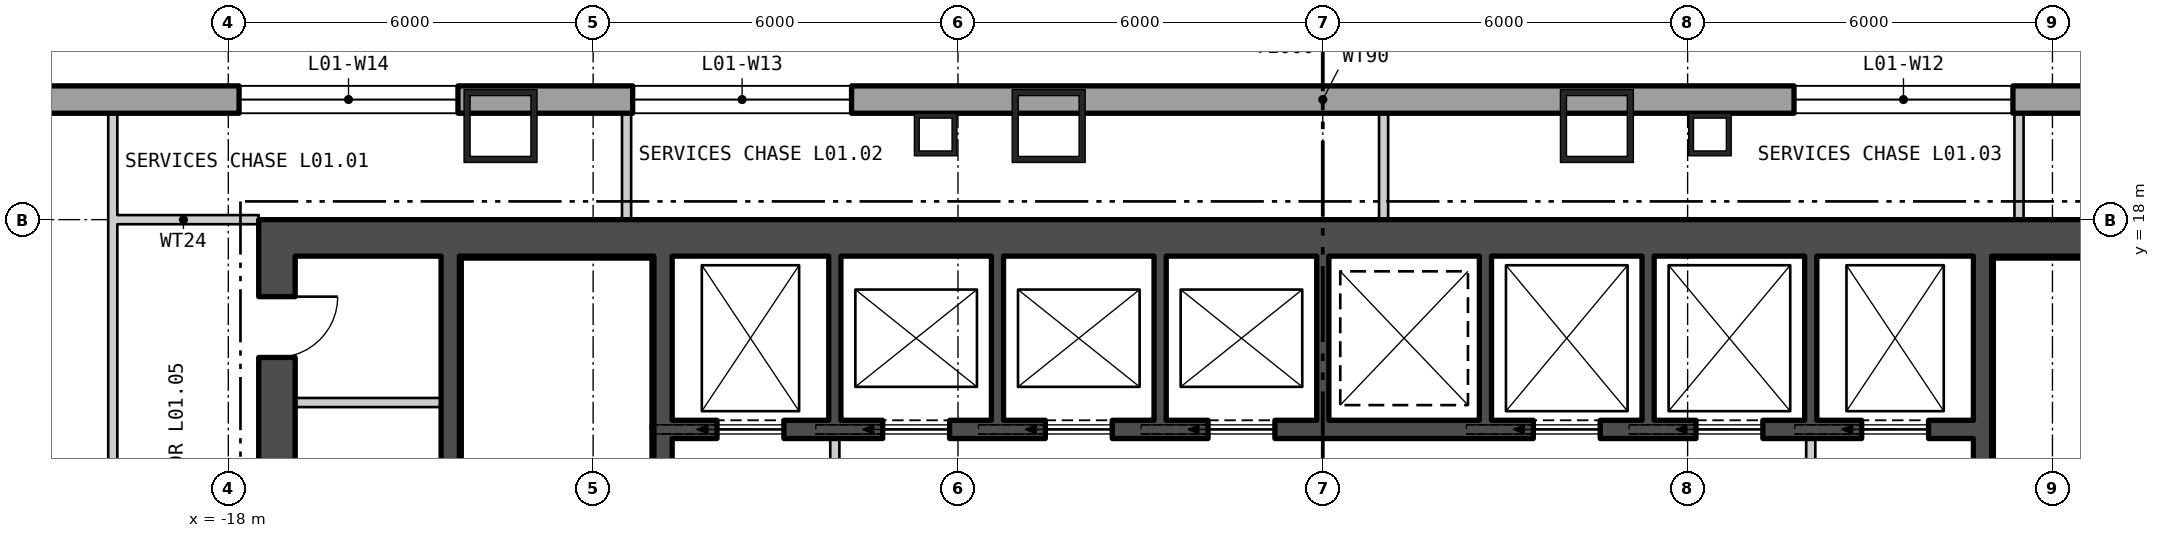
"""IFC4 building model, lengths in metres.
Left out: names, types, materials, properties, quantities, classifications, styles, units other than length and angle.
Written with IfcOpenShell. Run it as: python <this file> out.ifc"""

import sys

from ifc_helpers import new_model, si_unit, direction, frame, frame_2d, origin, origin_2d, place, context, subcontext, project, spatial, polyline, rectangle, hollow_rectangle, outline, extrude, element, fill, save


model = new_model("IFC4")
c1 = context("Model", 3, precision=1e-05, world=origin(), true_north=direction((0.0, 1.0)))
c2 = subcontext(c1, "Body", "Model", "MODEL_VIEW")
j1 = project(units=[si_unit("LENGTHUNIT", "METRE"), si_unit("PLANEANGLEUNIT", "RADIAN")], contexts=[c1])
p1 = place(None, origin())
s1 = spatial("IfcSite", under=j1, at=p1, CompositionType="ELEMENT")
p2 = place(p1, origin())
s2 = spatial("IfcBuilding", under=s1, at=p2, CompositionType="ELEMENT")
p3 = place(p2, frame((0.0, 0.0, 8.4)))
s3 = spatial("IfcBuildingStorey", under=s2, at=p3, CompositionType="ELEMENT", Elevation=8.4)
for number, where, z_axis, x_axis in (
    (1, (4.508, 19.54, 0.0), (0.0, 0.0, 1.0), (-1.0, 0.0, 0.0)),
    (2, (-4.508, 19.54, 0.0), (0.0, 0.0, 1.0), (-1.0, 0.0, 0.0)),
    (3, (-13.523, 19.54, 0.0), (0.0, 0.0, 1.0), (-1.0, 0.0, 0.0)),
):
    element("IfcColumn", number, at=place(p3, frame(where, z_axis=z_axis, x_axis=x_axis)), inside=s3, PredefinedType="COLUMN", context=c2, shape_type="SweptSolid", body=[
        extrude(hollow_rectangle(XDim=1.2, YDim=1.2, WallThickness=0.1, at=origin_2d()), origin(), (0.0, 0.0, 1.0), 5.1),
    ])
for number, where, z_axis, x_axis in (
    (4, (6.367, 19.4, 0.0), (0.0, 0.0, 1.0), (-1.0, 0.0, 0.0)),
    (5, (-6.367, 19.4, 0.0), (0.0, 0.0, 1.0), (-1.0, 0.0, 0.0)),
):
    element("IfcColumn", number, at=place(p3, frame(where, z_axis=z_axis, x_axis=x_axis)), inside=s3, PredefinedType="COLUMN", context=c2, shape_type="SweptSolid", body=[
        extrude(hollow_rectangle(XDim=0.7, YDim=0.7, WallThickness=0.08, at=origin_2d()), origin(), (0.0, 0.0, 1.0), 5.1),
    ])
p4 = place(p3, frame((38.775, 19.975, -0.4), z_axis=(0.0, 0.0, 1.0), x_axis=(-1.0, 0.0, 0.0)))
e6 = element("IfcWall", 6, at=p4, inside=s3, PredefinedType="SOLIDWALL", context=c2, shape_type="SweptSolid", body=[
    extrude(outline(polyline([(-0.225, -0.225), (77.775, -0.225), (77.325, 0.225), (0.225, 0.225), (-0.225, -0.225)])), origin(), (0.0, 0.0, 1.0), 5.1),
])
p5 = place(p4, frame((1.958, 0.0, 1.3)))
e7 = element("IfcOpeningElement", 7, at=p5, cuts=e6, PredefinedType="OPENING", context=c2, shape_type="SweptSolid", body=[
    extrude(rectangle(XDim=3.6, YDim=3.2, at=frame_2d((1.8, 1.6))), frame((0.0, 0.235, 0.0), z_axis=(0.0, -1.0, 0.0), x_axis=(1.0, 0.0, 0.0)), (0.0, 0.0, 1.0), 0.47),
])
p6 = place(p4, frame((8.325, 0.0, 1.3)))
e8 = element("IfcOpeningElement", 8, at=p6, cuts=e6, PredefinedType="OPENING", context=c2, shape_type="SweptSolid", body=[
    extrude(rectangle(XDim=3.6, YDim=3.2, at=frame_2d((1.8, 1.6))), frame((0.0, 0.235, 0.0), z_axis=(0.0, -1.0, 0.0), x_axis=(1.0, 0.0, 0.0)), (0.0, 0.0, 1.0), 0.47),
])
p7 = place(p4, frame((20.952, 0.0, 1.3)))
e9 = element("IfcOpeningElement", 9, at=p7, cuts=e6, PredefinedType="OPENING", context=c2, shape_type="SweptSolid", body=[
    extrude(rectangle(XDim=3.6, YDim=3.2, at=frame_2d((1.8, 1.6))), frame((0.0, 0.235, 0.0), z_axis=(0.0, -1.0, 0.0), x_axis=(1.0, 0.0, 0.0)), (0.0, 0.0, 1.0), 0.47),
])
p8 = place(p4, frame((27.425, 0.0, 1.3)))
e10 = element("IfcOpeningElement", 10, at=p8, cuts=e6, PredefinedType="OPENING", context=c2, shape_type="SweptSolid", body=[
    extrude(rectangle(XDim=3.6, YDim=3.2, at=frame_2d((1.8, 1.6))), frame((0.0, 0.235, 0.0), z_axis=(0.0, -1.0, 0.0), x_axis=(1.0, 0.0, 0.0)), (0.0, 0.0, 1.0), 0.47),
])
p9 = place(p4, frame((46.525, 0.0, 1.3)))
e11 = element("IfcOpeningElement", 11, at=p9, cuts=e6, PredefinedType="OPENING", context=c2, shape_type="SweptSolid", body=[
    extrude(rectangle(XDim=3.6, YDim=3.2, at=frame_2d((1.8, 1.6))), frame((0.0, 0.235, 0.0), z_axis=(0.0, -1.0, 0.0), x_axis=(1.0, 0.0, 0.0)), (0.0, 0.0, 1.0), 0.47),
])
p10 = place(p4, frame((52.998, 0.0, 1.3)))
e12 = element("IfcOpeningElement", 12, at=p10, cuts=e6, PredefinedType="OPENING", context=c2, shape_type="SweptSolid", body=[
    extrude(rectangle(XDim=3.6, YDim=3.2, at=frame_2d((1.8, 1.6))), frame((0.0, 0.235, 0.0), z_axis=(0.0, -1.0, 0.0), x_axis=(1.0, 0.0, 0.0)), (0.0, 0.0, 1.0), 0.47),
])
p11 = place(p4, frame((65.625, 0.0, 1.3)))
e13 = element("IfcOpeningElement", 13, at=p11, cuts=e6, PredefinedType="OPENING", context=c2, shape_type="SweptSolid", body=[
    extrude(rectangle(XDim=3.6, YDim=3.2, at=frame_2d((1.8, 1.6))), frame((0.0, 0.235, 0.0), z_axis=(0.0, -1.0, 0.0), x_axis=(1.0, 0.0, 0.0)), (0.0, 0.0, 1.0), 0.47),
])
p12 = place(p4, frame((71.992, 0.0, 1.3)))
e14 = element("IfcOpeningElement", 14, at=p12, cuts=e6, PredefinedType="OPENING", context=c2, shape_type="SweptSolid", body=[
    extrude(rectangle(XDim=3.6, YDim=3.2, at=frame_2d((1.8, 1.6))), frame((0.0, 0.235, 0.0), z_axis=(0.0, -1.0, 0.0), x_axis=(1.0, 0.0, 0.0)), (0.0, 0.0, 1.0), 0.47),
])
p13 = place(p3, frame((-17.5, 17.7, 0.0), z_axis=(0.0, 0.0, 1.0), x_axis=(1.0, 0.0, 0.0)))
e15 = element("IfcWall", 15, at=p13, inside=s3, PredefinedType="SHEAR", context=c2, shape_type="SweptSolid", body=[
    extrude(rectangle(XDim=35.0, YDim=0.6, at=frame_2d((17.5, 0.0))), origin(), (0.0, 0.0, 1.0), 4.88),
])
p14 = place(p3, frame((-17.2, 0.6, 0.0), z_axis=(0.0, 0.0, 1.0), x_axis=(0.0, 1.0, 0.0)))
e16 = element("IfcWall", 16, at=p14, inside=s3, PredefinedType="SHEAR", context=c2, shape_type="SweptSolid", body=[
    extrude(rectangle(XDim=16.8, YDim=0.6, at=frame_2d((8.4, 0.0))), origin(), (0.0, 0.0, 1.0), 4.88),
])
p15 = place(p14, frame((5.7, 0.0, 0.0)))
e17 = element("IfcOpeningElement", 17, at=p15, cuts=e16, PredefinedType="OPENING", context=c2, shape_type="SweptSolid", body=[
    extrude(rectangle(XDim=1.5, YDim=2.1, at=frame_2d((0.75, 1.05))), frame((0.0, 0.31, 0.0), z_axis=(0.0, -1.0, 0.0), x_axis=(1.0, 0.0, 0.0)), (0.0, 0.0, 1.0), 0.62),
])
p16 = place(p14, frame((1.214, 0.0, 0.0)))
e18 = element("IfcOpeningElement", 18, at=p16, cuts=e16, PredefinedType="OPENING", context=c2, shape_type="SweptSolid", body=[
    extrude(rectangle(XDim=0.9, YDim=2.1, at=frame_2d((0.45, 1.05))), frame((0.0, 0.31, 0.0), z_axis=(0.0, -1.0, 0.0), x_axis=(1.0, 0.0, 0.0)), (0.0, 0.0, 1.0), 0.62),
])
p17 = place(p14, frame((4.064, 0.0, 0.0)))
e19 = element("IfcOpeningElement", 19, at=p17, cuts=e16, PredefinedType="OPENING", context=c2, shape_type="SweptSolid", body=[
    extrude(rectangle(XDim=0.9, YDim=2.1, at=frame_2d((0.45, 1.05))), frame((0.0, 0.31, 0.0), z_axis=(0.0, -1.0, 0.0), x_axis=(1.0, 0.0, 0.0)), (0.0, 0.0, 1.0), 0.62),
])
p18 = place(p14, frame((10.383, 0.0, 0.0)))
e20 = element("IfcOpeningElement", 20, at=p18, cuts=e16, PredefinedType="OPENING", context=c2, shape_type="SweptSolid", body=[
    extrude(rectangle(XDim=0.9, YDim=2.1, at=frame_2d((0.45, 1.05))), frame((0.0, 0.31, 0.0), z_axis=(0.0, -1.0, 0.0), x_axis=(1.0, 0.0, 0.0)), (0.0, 0.0, 1.0), 0.62),
])
p19 = place(p14, frame((15.133, 0.0, 0.0)))
e21 = element("IfcOpeningElement", 21, at=p19, cuts=e16, PredefinedType="OPENING", context=c2, shape_type="SweptSolid", body=[
    extrude(rectangle(XDim=1.0, YDim=2.1, at=frame_2d((0.5, 1.05))), frame((0.0, 0.31, 0.0), z_axis=(0.0, -1.0, 0.0), x_axis=(1.0, 0.0, 0.0)), (0.0, 0.0, 1.0), 0.62),
])
p20 = place(p3, frame((-10.85, 0.6, 0.0), z_axis=(0.0, 0.0, 1.0), x_axis=(0.0, 1.0, 0.0)))
e22 = element("IfcWall", 22, at=p20, inside=s3, PredefinedType="SHEAR", context=c2, shape_type="SweptSolid", body=[
    extrude(rectangle(XDim=16.8, YDim=0.3, at=frame_2d((8.4, 0.0))), origin(), (0.0, 0.0, 1.0), 4.88),
])
p21 = place(p20, frame((5.075, 0.0, 0.0)))
e23 = element("IfcOpeningElement", 23, at=p21, cuts=e22, PredefinedType="OPENING", context=c2, shape_type="SweptSolid", body=[
    extrude(rectangle(XDim=1.25, YDim=2.1, at=frame_2d((0.625, 1.05))), frame((0.0, 0.16, 0.0), z_axis=(0.0, -1.0, 0.0), x_axis=(1.0, 0.0, 0.0)), (0.0, 0.0, 1.0), 0.32),
])
p22 = place(p20, frame((1.525, 0.0, 0.0)))
e24 = element("IfcOpeningElement", 24, at=p22, cuts=e22, PredefinedType="OPENING", context=c2, shape_type="SweptSolid", body=[
    extrude(rectangle(XDim=1.0, YDim=2.1, at=frame_2d((0.5, 1.05))), frame((0.0, 0.16, 0.0), z_axis=(0.0, -1.0, 0.0), x_axis=(1.0, 0.0, 0.0)), (0.0, 0.0, 1.0), 0.32),
])
p23 = place(p3, frame((-14.35, 0.6, 0.0), z_axis=(0.0, 0.0, 1.0), x_axis=(0.0, 1.0, 0.0)))
e25 = element("IfcWall", 25, at=p23, inside=s3, PredefinedType="SHEAR", context=c2, shape_type="SweptSolid", body=[
    extrude(rectangle(XDim=16.8, YDim=0.3, at=frame_2d((8.4, 0.0))), origin(), (0.0, 0.0, 1.0), 4.88),
])
p24 = place(p23, frame((5.7, 0.0, 0.0)))
e26 = element("IfcOpeningElement", 26, at=p24, cuts=e25, PredefinedType="OPENING", context=c2, shape_type="SweptSolid", body=[
    extrude(rectangle(XDim=1.5, YDim=2.1, at=frame_2d((0.75, 1.05))), frame((0.0, 0.16, 0.0), z_axis=(0.0, -1.0, 0.0), x_axis=(1.0, 0.0, 0.0)), (0.0, 0.0, 1.0), 0.32),
])
p25 = place(p3, frame((10.85, 0.6, 0.0), z_axis=(0.0, 0.0, 1.0), x_axis=(0.0, 1.0, 0.0)))
e27 = element("IfcWall", 27, at=p25, inside=s3, PredefinedType="SHEAR", context=c2, shape_type="SweptSolid", body=[
    extrude(rectangle(XDim=16.8, YDim=0.3, at=frame_2d((8.4, 0.0))), origin(), (0.0, 0.0, 1.0), 4.88),
])
p26 = place(p25, frame((5.075, 0.0, 0.0)))
e28 = element("IfcOpeningElement", 28, at=p26, cuts=e27, PredefinedType="OPENING", context=c2, shape_type="SweptSolid", body=[
    extrude(rectangle(XDim=1.25, YDim=2.1, at=frame_2d((0.625, 1.05))), frame((0.0, 0.16, 0.0), z_axis=(0.0, -1.0, 0.0), x_axis=(1.0, 0.0, 0.0)), (0.0, 0.0, 1.0), 0.32),
])
p27 = place(p25, frame((1.525, 0.0, 0.0)))
e29 = element("IfcOpeningElement", 29, at=p27, cuts=e27, PredefinedType="OPENING", context=c2, shape_type="SweptSolid", body=[
    extrude(rectangle(XDim=1.0, YDim=2.1, at=frame_2d((0.5, 1.05))), frame((0.0, 0.16, 0.0), z_axis=(0.0, -1.0, 0.0), x_axis=(1.0, 0.0, 0.0)), (0.0, 0.0, 1.0), 0.32),
])
p28 = place(p3, frame((-10.7, 14.55, 0.0), z_axis=(0.0, 0.0, 1.0), x_axis=(1.0, 0.0, 0.0)))
e30 = element("IfcWall", 30, at=p28, inside=s3, PredefinedType="SHEAR", context=c2, shape_type="SweptSolid", body=[
    extrude(rectangle(XDim=21.4, YDim=0.3, at=frame_2d((10.7, 0.0))), origin(), (0.0, 0.0, 1.0), 4.88),
])
p29 = place(p28, frame((0.738, 0.0, 0.0)))
e31 = element("IfcOpeningElement", 31, at=p29, cuts=e30, PredefinedType="OPENING", context=c2, shape_type="SweptSolid", body=[
    extrude(rectangle(XDim=1.1, YDim=2.1, at=frame_2d((0.55, 1.05))), frame((0.0, 0.16, 0.0), z_axis=(0.0, -1.0, 0.0), x_axis=(1.0, 0.0, 0.0)), (0.0, 0.0, 1.0), 0.32),
])
p30 = place(p28, frame((3.462, 0.0, 0.0)))
e32 = element("IfcOpeningElement", 32, at=p30, cuts=e30, PredefinedType="OPENING", context=c2, shape_type="SweptSolid", body=[
    extrude(rectangle(XDim=1.1, YDim=2.1, at=frame_2d((0.55, 1.05))), frame((0.0, 0.16, 0.0), z_axis=(0.0, -1.0, 0.0), x_axis=(1.0, 0.0, 0.0)), (0.0, 0.0, 1.0), 0.32),
])
p31 = place(p28, frame((6.138, 0.0, 0.0)))
e33 = element("IfcOpeningElement", 33, at=p31, cuts=e30, PredefinedType="OPENING", context=c2, shape_type="SweptSolid", body=[
    extrude(rectangle(XDim=1.1, YDim=2.1, at=frame_2d((0.55, 1.05))), frame((0.0, 0.16, 0.0), z_axis=(0.0, -1.0, 0.0), x_axis=(1.0, 0.0, 0.0)), (0.0, 0.0, 1.0), 0.32),
])
p32 = place(p28, frame((8.812, 0.0, 0.0)))
e34 = element("IfcOpeningElement", 34, at=p32, cuts=e30, PredefinedType="OPENING", context=c2, shape_type="SweptSolid", body=[
    extrude(rectangle(XDim=1.1, YDim=2.1, at=frame_2d((0.55, 1.05))), frame((0.0, 0.16, 0.0), z_axis=(0.0, -1.0, 0.0), x_axis=(1.0, 0.0, 0.0)), (0.0, 0.0, 1.0), 0.32),
])
p33 = place(p28, frame((14.162, 0.0, 0.0)))
e35 = element("IfcOpeningElement", 35, at=p33, cuts=e30, PredefinedType="OPENING", context=c2, shape_type="SweptSolid", body=[
    extrude(rectangle(XDim=1.1, YDim=2.1, at=frame_2d((0.55, 1.05))), frame((0.0, 0.16, 0.0), z_axis=(0.0, -1.0, 0.0), x_axis=(1.0, 0.0, 0.0)), (0.0, 0.0, 1.0), 0.32),
])
p34 = place(p28, frame((16.837, 0.0, 0.0)))
e36 = element("IfcOpeningElement", 36, at=p34, cuts=e30, PredefinedType="OPENING", context=c2, shape_type="SweptSolid", body=[
    extrude(rectangle(XDim=1.1, YDim=2.1, at=frame_2d((0.55, 1.05))), frame((0.0, 0.16, 0.0), z_axis=(0.0, -1.0, 0.0), x_axis=(1.0, 0.0, 0.0)), (0.0, 0.0, 1.0), 0.32),
])
p35 = place(p28, frame((19.562, 0.0, 0.0)))
e37 = element("IfcOpeningElement", 37, at=p35, cuts=e30, PredefinedType="OPENING", context=c2, shape_type="SweptSolid", body=[
    extrude(rectangle(XDim=1.1, YDim=2.1, at=frame_2d((0.55, 1.05))), frame((0.0, 0.16, 0.0), z_axis=(0.0, -1.0, 0.0), x_axis=(1.0, 0.0, 0.0)), (0.0, 0.0, 1.0), 0.32),
])
for number, where, z_axis, x_axis in (
    (38, (-8.025, 14.7, 0.0), (0.0, 0.0, 1.0), (0.0, 1.0, 0.0)),
    (39, (-5.35, 14.7, 0.0), (0.0, 0.0, 1.0), (0.0, 1.0, 0.0)),
    (40, (-2.675, 14.7, 0.0), (0.0, 0.0, 1.0), (0.0, 1.0, 0.0)),
    (41, (0.0, 14.7, 0.0), (0.0, 0.0, 1.0), (0.0, 1.0, 0.0)),
    (42, (2.675, 14.7, 0.0), (0.0, 0.0, 1.0), (0.0, 1.0, 0.0)),
    (43, (5.35, 14.7, 0.0), (0.0, 0.0, 1.0), (0.0, 1.0, 0.0)),
    (44, (8.025, 14.7, 0.0), (0.0, 0.0, 1.0), (0.0, 1.0, 0.0)),
):
    element("IfcWall", number, at=place(p3, frame(where, z_axis=z_axis, x_axis=x_axis)), inside=s3, PredefinedType="SHEAR", context=c2, shape_type="SweptSolid", body=[
        extrude(rectangle(XDim=2.7, YDim=0.2, at=frame_2d((1.35, 0.0))), origin(), (0.0, 0.0, 1.0), 4.88),
    ])
p36 = place(p3, frame((-8.025, 10.8, 0.0), z_axis=(0.0, 0.0, 1.0), x_axis=(0.0, 1.0, 0.0)))
e45 = element("IfcWall", 45, at=p36, inside=s3, PredefinedType="PARTITIONING", context=c2, shape_type="SweptSolid", body=[
    extrude(rectangle(XDim=3.6, YDim=0.15, at=frame_2d((1.8, 0.0))), origin(), (0.0, 0.0, 1.0), 4.88),
])
p37 = place(p36, frame((1.175, 0.0, 0.0)))
e46 = element("IfcOpeningElement", 46, at=p37, cuts=e45, PredefinedType="OPENING", context=c2, shape_type="SweptSolid", body=[
    extrude(rectangle(XDim=1.25, YDim=2.1, at=frame_2d((0.625, 1.05))), frame((0.0, 0.085, 0.0), z_axis=(0.0, -1.0, 0.0), x_axis=(1.0, 0.0, 0.0)), (0.0, 0.0, 1.0), 0.17),
])
p38 = place(p3, frame((8.025, 10.8, 0.0), z_axis=(0.0, 0.0, 1.0), x_axis=(0.0, 1.0, 0.0)))
e47 = element("IfcWall", 47, at=p38, inside=s3, PredefinedType="PARTITIONING", context=c2, shape_type="SweptSolid", body=[
    extrude(rectangle(XDim=3.6, YDim=0.15, at=frame_2d((1.8, 0.0))), origin(), (0.0, 0.0, 1.0), 4.88),
])
p39 = place(p38, frame((1.175, 0.0, 0.0)))
e48 = element("IfcOpeningElement", 48, at=p39, cuts=e47, PredefinedType="OPENING", context=c2, shape_type="SweptSolid", body=[
    extrude(rectangle(XDim=1.25, YDim=2.1, at=frame_2d((0.625, 1.05))), frame((0.0, 0.085, 0.0), z_axis=(0.0, -1.0, 0.0), x_axis=(1.0, 0.0, 0.0)), (0.0, 0.0, 1.0), 0.17),
])
p40 = place(p3, frame((-16.9, 14.992, 0.0), z_axis=(0.0, 0.0, 1.0), x_axis=(1.0, 0.0, 0.0)))
e49 = element("IfcWall", 49, at=p40, inside=s3, PredefinedType="PARTITIONING", context=c2, shape_type="SweptSolid", body=[
    extrude(rectangle(XDim=2.4, YDim=0.15, at=frame_2d((1.2, 0.0))), origin(), (0.0, 0.0, 1.0), 4.88),
])
p41 = place(p3, frame((-19.975, 18.0, 0.0), z_axis=(0.0, 0.0, 1.0), x_axis=(1.0, 0.0, 0.0)))
e50 = element("IfcWall", 50, at=p41, inside=s3, PredefinedType="PARTITIONING", context=c2, shape_type="SweptSolid", body=[
    extrude(rectangle(XDim=2.475, YDim=0.15, at=frame_2d((1.238, 0.0))), origin(), (0.0, 0.0, 1.0), 4.33),
])
p42 = place(p3, frame((-19.9, 1.101, 0.0), z_axis=(0.0, 0.0, 1.0), x_axis=(0.0, 1.0, 0.0)))
e51 = element("IfcWall", 51, at=p42, inside=s3, PredefinedType="PARTITIONING", context=c2, shape_type="SweptSolid", body=[
    extrude(rectangle(XDim=16.824, YDim=0.15, at=frame_2d((8.412, 0.0))), origin(), (0.0, 0.0, 1.0), 4.88),
])
p43 = place(p42, frame((3.567, 0.0, 0.0)))
e52 = element("IfcOpeningElement", 52, at=p43, cuts=e51, PredefinedType="OPENING", context=c2, shape_type="SweptSolid", body=[
    extrude(rectangle(XDim=1.0, YDim=2.1, at=frame_2d((0.5, 1.05))), frame((0.0, 0.085, 0.0), z_axis=(0.0, -1.0, 0.0), x_axis=(1.0, 0.0, 0.0)), (0.0, 0.0, 1.0), 0.17),
])
p44 = place(p3, frame((-19.9, 18.075, 0.0), z_axis=(0.0, 0.0, 1.0), x_axis=(0.0, 1.0, 0.0)))
e53 = element("IfcWall", 53, at=p44, inside=s3, PredefinedType="PARTITIONING", context=c2, shape_type="SweptSolid", body=[
    extrude(rectangle(XDim=1.675, YDim=0.15, at=frame_2d((0.838, 0.0))), origin(), (0.0, 0.0, 1.0), 4.88),
])
for number, where, z_axis, x_axis in (
    (54, (-11.45, 18.0, 0.0), (0.0, 0.0, 1.0), (0.0, 1.0, 0.0)),
    (55, (1.0, 18.0, 0.0), (0.0, 0.0, 1.0), (0.0, 1.0, 0.0)),
    (56, (11.45, 18.0, 0.0), (0.0, 0.0, 1.0), (0.0, 1.0, 0.0)),
):
    element("IfcWall", number, at=place(p3, frame(where, z_axis=z_axis, x_axis=x_axis)), inside=s3, PredefinedType="PARTITIONING", context=c2, shape_type="SweptSolid", body=[
        extrude(rectangle(XDim=1.75, YDim=0.15, at=frame_2d((0.875, 0.0))), origin(), (0.0, 0.0, 1.0), 4.88),
    ])
p45 = place(p8, origin())
e57 = element("IfcWindow", 57, at=p45, inside=s3, PartitioningType="SINGLE_PANEL", PredefinedType="WINDOW", context=c2, shape_type="SweptSolid", body=[
    extrude(rectangle(XDim=3.6, YDim=3.2, at=frame_2d((1.8, 1.6))), frame((0.0, 0.105, 0.0), z_axis=(0.0, -1.0, 0.0), x_axis=(1.0, 0.0, 0.0)), (0.0, 0.0, 1.0), 0.06),
])
fill(e10, e57)
p46 = place(p9, origin())
e58 = element("IfcWindow", 58, at=p46, inside=s3, PartitioningType="SINGLE_PANEL", PredefinedType="WINDOW", context=c2, shape_type="SweptSolid", body=[
    extrude(rectangle(XDim=3.6, YDim=3.2, at=frame_2d((1.8, 1.6))), frame((0.0, 0.105, 0.0), z_axis=(0.0, -1.0, 0.0), x_axis=(1.0, 0.0, 0.0)), (0.0, 0.0, 1.0), 0.06),
])
fill(e11, e58)
p47 = place(p10, origin())
e59 = element("IfcWindow", 59, at=p47, inside=s3, PartitioningType="SINGLE_PANEL", PredefinedType="WINDOW", context=c2, shape_type="SweptSolid", body=[
    extrude(rectangle(XDim=3.6, YDim=3.2, at=frame_2d((1.8, 1.6))), frame((0.0, 0.105, 0.0), z_axis=(0.0, -1.0, 0.0), x_axis=(1.0, 0.0, 0.0)), (0.0, 0.0, 1.0), 0.06),
])
fill(e12, e59)
p48 = place(p29, origin())
e60 = element("IfcDoor", 60, at=p48, inside=s3, OperationType="SLIDING_TO_LEFT", PredefinedType="DOOR", context=c2, shape_type="SweptSolid", body=[
    extrude(rectangle(XDim=1.1, YDim=2.1, at=frame_2d((0.55, 1.05))), frame((0.0, 0.025, 0.0), z_axis=(0.0, -1.0, 0.0), x_axis=(1.0, 0.0, 0.0)), (0.0, 0.0, 1.0), 0.05),
])
fill(e31, e60)
p49 = place(p30, origin())
e61 = element("IfcDoor", 61, at=p49, inside=s3, OperationType="SLIDING_TO_LEFT", PredefinedType="DOOR", context=c2, shape_type="SweptSolid", body=[
    extrude(rectangle(XDim=1.1, YDim=2.1, at=frame_2d((0.55, 1.05))), frame((0.0, 0.025, 0.0), z_axis=(0.0, -1.0, 0.0), x_axis=(1.0, 0.0, 0.0)), (0.0, 0.0, 1.0), 0.05),
])
fill(e32, e61)
p50 = place(p31, origin())
e62 = element("IfcDoor", 62, at=p50, inside=s3, OperationType="SLIDING_TO_LEFT", PredefinedType="DOOR", context=c2, shape_type="SweptSolid", body=[
    extrude(rectangle(XDim=1.1, YDim=2.1, at=frame_2d((0.55, 1.05))), frame((0.0, 0.025, 0.0), z_axis=(0.0, -1.0, 0.0), x_axis=(1.0, 0.0, 0.0)), (0.0, 0.0, 1.0), 0.05),
])
fill(e33, e62)
p51 = place(p32, origin())
e63 = element("IfcDoor", 63, at=p51, inside=s3, OperationType="SLIDING_TO_LEFT", PredefinedType="DOOR", context=c2, shape_type="SweptSolid", body=[
    extrude(rectangle(XDim=1.1, YDim=2.1, at=frame_2d((0.55, 1.05))), frame((0.0, 0.025, 0.0), z_axis=(0.0, -1.0, 0.0), x_axis=(1.0, 0.0, 0.0)), (0.0, 0.0, 1.0), 0.05),
])
fill(e34, e63)
p52 = place(p33, origin())
e64 = element("IfcDoor", 64, at=p52, inside=s3, OperationType="SLIDING_TO_LEFT", PredefinedType="DOOR", context=c2, shape_type="SweptSolid", body=[
    extrude(rectangle(XDim=1.1, YDim=2.1, at=frame_2d((0.55, 1.05))), frame((0.0, 0.025, 0.0), z_axis=(0.0, -1.0, 0.0), x_axis=(1.0, 0.0, 0.0)), (0.0, 0.0, 1.0), 0.05),
])
fill(e35, e64)
p53 = place(p34, origin())
e65 = element("IfcDoor", 65, at=p53, inside=s3, OperationType="SLIDING_TO_LEFT", PredefinedType="DOOR", context=c2, shape_type="SweptSolid", body=[
    extrude(rectangle(XDim=1.1, YDim=2.1, at=frame_2d((0.55, 1.05))), frame((0.0, 0.025, 0.0), z_axis=(0.0, -1.0, 0.0), x_axis=(1.0, 0.0, 0.0)), (0.0, 0.0, 1.0), 0.05),
])
fill(e36, e65)
p54 = place(p35, origin())
e66 = element("IfcDoor", 66, at=p54, inside=s3, OperationType="SLIDING_TO_LEFT", PredefinedType="DOOR", context=c2, shape_type="SweptSolid", body=[
    extrude(rectangle(XDim=1.1, YDim=2.1, at=frame_2d((0.55, 1.05))), frame((0.0, 0.025, 0.0), z_axis=(0.0, -1.0, 0.0), x_axis=(1.0, 0.0, 0.0)), (0.0, 0.0, 1.0), 0.05),
])
fill(e37, e66)
p55 = place(p19, origin())
e67 = element("IfcDoor", 67, at=p55, inside=s3, OperationType="SINGLE_SWING_RIGHT", PredefinedType="DOOR", context=c2, shape_type="SweptSolid", body=[
    extrude(rectangle(XDim=1.0, YDim=2.1, at=frame_2d((0.5, 1.05))), frame((0.0, 0.025, 0.0), z_axis=(0.0, -1.0, 0.0), x_axis=(1.0, 0.0, 0.0)), (0.0, 0.0, 1.0), 0.05),
])
fill(e21, e67)
save(model, sys.argv[1])
